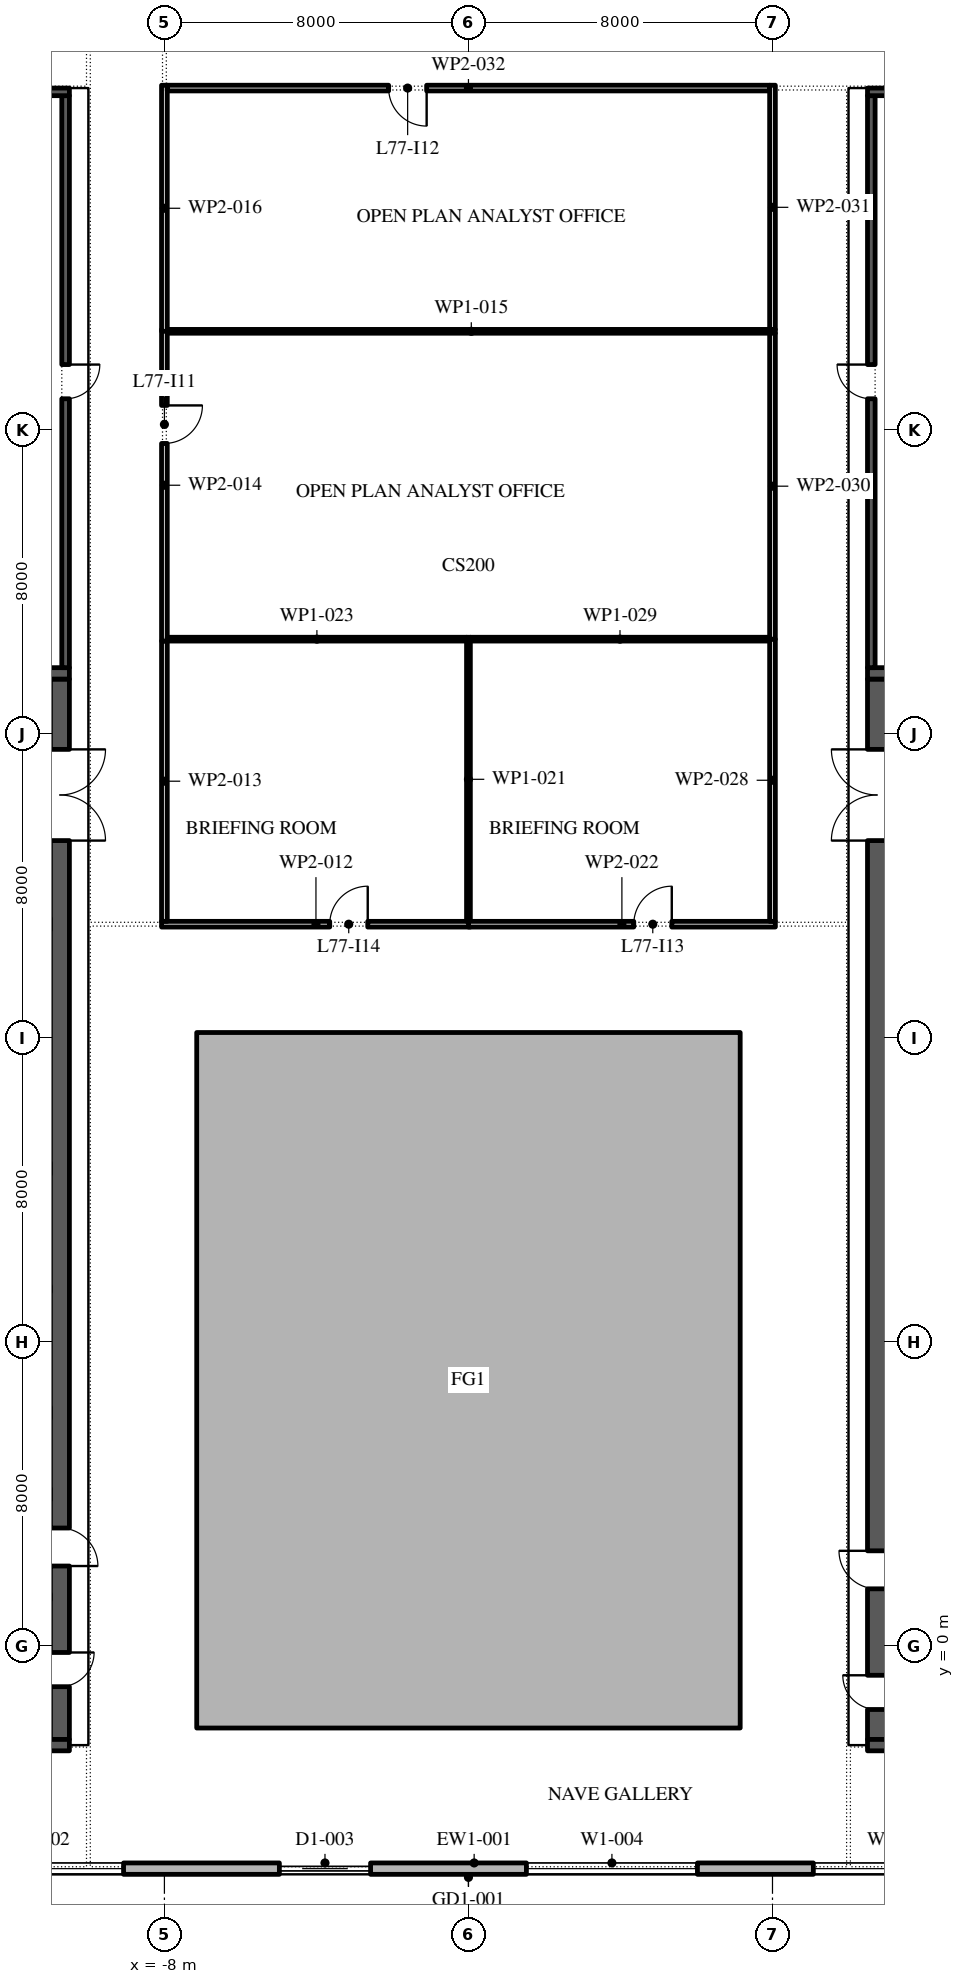
"""IFC4 building model, lengths in metres.
Left out: names, types, materials, properties, quantities, classifications, styles, units other than length and angle.
Written with IfcOpenShell. Run it as: python <this file> out.ifc"""

import sys

from ifc_helpers import new_model, si_unit, direction, frame, frame_2d, origin, place, context, subcontext, project, spatial, polyline, rectangle, outline, extrude, element, fill, save


model = new_model("IFC4")
c1 = context("Model", 3, precision=1e-05, world=origin(), true_north=direction((0.0, 1.0)))
c2 = subcontext(c1, "Body", "Model", "MODEL_VIEW")
j1 = project(units=[si_unit("LENGTHUNIT", "METRE"), si_unit("PLANEANGLEUNIT", "RADIAN")], contexts=[c1])
p1 = place(None, origin())
s1 = spatial("IfcSite", under=j1, at=p1, CompositionType="ELEMENT")
p2 = place(p1, origin())
s2 = spatial("IfcBuilding", under=s1, at=p2, CompositionType="ELEMENT")
p3 = place(p2, frame((0.0, 0.0, 351.0)))
s3 = spatial("IfcBuildingStorey", under=s2, at=p3, CompositionType="ELEMENT", Elevation=351.0)
p4 = place(p3, origin())
e1 = element("IfcWall", 1, at=p4, inside=s3, PredefinedType="STANDARD", context=c2, shape_type="SweptSolid", body=[
    extrude(outline(polyline([(-7.15, -2.15), (7.15, -2.15), (7.15, 16.15), (-7.15, 16.15), (-7.15, -2.15)]), holes=[polyline([(-7.0, -2.0), (-7.0, 16.0), (7.0, 16.0), (7.0, -2.0), (-7.0, -2.0)])]), origin(), (0.0, 0.0, 1.0), 4.0),
])
p5 = place(p3, frame((-22.35, -5.85, 0.0), z_axis=(0.0, 0.0, 1.0), x_axis=(1.0, 0.0, 0.0)))
e2 = element("IfcWall", 2, at=p5, inside=s3, PredefinedType="STANDARD", context=c2, shape_type="SweptSolid", body=[
    extrude(rectangle(XDim=45.0, YDim=0.3, at=frame_2d((22.5, 0.0))), origin(), (0.0, 0.0, 1.0), 4.0),
])
p6 = place(p5, frame((1.375, 0.0, 0.45)))
e3 = element("IfcOpeningElement", 3, at=p6, cuts=e2, PredefinedType="OPENING", context=c2, shape_type="SweptSolid", body=[
    extrude(rectangle(XDim=4.5, YDim=3.05, at=frame_2d((2.25, 1.525))), frame((0.0, 0.16, 0.0), z_axis=(0.0, -1.0, 0.0), x_axis=(1.0, 0.0, 0.0)), (0.0, 0.0, 1.0), 0.32),
])
p7 = place(p5, frame((8.775, 0.0, 0.45)))
e4 = element("IfcOpeningElement", 4, at=p7, cuts=e2, PredefinedType="OPENING", context=c2, shape_type="SweptSolid", body=[
    extrude(rectangle(XDim=4.5, YDim=3.05, at=frame_2d((2.25, 1.525))), frame((0.0, 0.16, 0.0), z_axis=(0.0, -1.0, 0.0), x_axis=(1.0, 0.0, 0.0)), (0.0, 0.0, 1.0), 0.32),
])
p8 = place(p5, frame((17.375, 0.0, 0.0)))
e5 = element("IfcOpeningElement", 5, at=p8, cuts=e2, PredefinedType="OPENING", context=c2, shape_type="SweptSolid", body=[
    extrude(rectangle(XDim=2.4, YDim=3.5, at=frame_2d((1.2, 1.75))), frame((0.0, 0.16, 0.0), z_axis=(0.0, -1.0, 0.0), x_axis=(1.0, 0.0, 0.0)), (0.0, 0.0, 1.0), 0.32),
])
p9 = place(p5, frame((23.875, 0.0, 0.45)))
e6 = element("IfcOpeningElement", 6, at=p9, cuts=e2, PredefinedType="OPENING", context=c2, shape_type="SweptSolid", body=[
    extrude(rectangle(XDim=4.5, YDim=3.05, at=frame_2d((2.25, 1.525))), frame((0.0, 0.16, 0.0), z_axis=(0.0, -1.0, 0.0), x_axis=(1.0, 0.0, 0.0)), (0.0, 0.0, 1.0), 0.32),
])
p10 = place(p5, frame((31.425, 0.0, 0.45)))
e7 = element("IfcOpeningElement", 7, at=p10, cuts=e2, PredefinedType="OPENING", context=c2, shape_type="SweptSolid", body=[
    extrude(rectangle(XDim=4.5, YDim=3.05, at=frame_2d((2.25, 1.525))), frame((0.0, 0.16, 0.0), z_axis=(0.0, -1.0, 0.0), x_axis=(1.0, 0.0, 0.0)), (0.0, 0.0, 1.0), 0.32),
])
p11 = place(p5, frame((38.975, 0.0, 0.45)))
e8 = element("IfcOpeningElement", 8, at=p11, cuts=e2, PredefinedType="OPENING", context=c2, shape_type="SweptSolid", body=[
    extrude(rectangle(XDim=4.5, YDim=3.05, at=frame_2d((2.25, 1.525))), frame((0.0, 0.16, 0.0), z_axis=(0.0, -1.0, 0.0), x_axis=(1.0, 0.0, 0.0)), (0.0, 0.0, 1.0), 0.32),
])
p12 = place(p3, frame((-10.75, -2.45, 0.0), z_axis=(0.0, 0.0, 1.0), x_axis=(0.0, 1.0, 0.0)))
e9 = element("IfcWall", 9, at=p12, inside=s3, PredefinedType="SHEAR", context=c2, shape_type="SweptSolid", body=[
    extrude(rectangle(XDim=27.9, YDim=0.5, at=frame_2d((13.95, 0.0))), origin(), (0.0, 0.0, 1.0), 4.0),
])
p13 = place(p12, frame((23.65, 0.0, 0.0)))
e10 = element("IfcOpeningElement", 10, at=p13, cuts=e9, PredefinedType="OPENING", context=c2, shape_type="SweptSolid", body=[
    extrude(rectangle(XDim=2.4, YDim=2.1, at=frame_2d((1.2, 1.05))), frame((0.0, 0.26, 0.0), z_axis=(0.0, -1.0, 0.0), x_axis=(1.0, 0.0, 0.0)), (0.0, 0.0, 1.0), 0.52),
])
p14 = place(p12, frame((1.387, 0.0, 0.0)))
e11 = element("IfcOpeningElement", 11, at=p14, cuts=e9, PredefinedType="OPENING", context=c2, shape_type="SweptSolid", body=[
    extrude(rectangle(XDim=0.9, YDim=2.1, at=frame_2d((0.45, 1.05))), frame((0.0, 0.26, 0.0), z_axis=(0.0, -1.0, 0.0), x_axis=(1.0, 0.0, 0.0)), (0.0, 0.0, 1.0), 0.52),
])
p15 = place(p12, frame((4.562, 0.0, 0.0)))
e12 = element("IfcOpeningElement", 12, at=p15, cuts=e9, PredefinedType="OPENING", context=c2, shape_type="SweptSolid", body=[
    extrude(rectangle(XDim=1.0, YDim=2.1, at=frame_2d((0.5, 1.05))), frame((0.0, 0.26, 0.0), z_axis=(0.0, -1.0, 0.0), x_axis=(1.0, 0.0, 0.0)), (0.0, 0.0, 1.0), 0.52),
])
for number, where, z_axis, x_axis in (
    (13, (-21.5, -2.6, 0.0), (0.0, 0.0, 1.0), (1.0, 0.0, 0.0)),
    (14, (-21.5, 25.6, 0.0), (0.0, 0.0, 1.0), (1.0, 0.0, 0.0)),
):
    element("IfcWall", number, at=place(p3, frame(where, z_axis=z_axis, x_axis=x_axis)), inside=s3, PredefinedType="SHEAR", context=c2, shape_type="SweptSolid", body=[
        extrude(rectangle(XDim=11.0, YDim=0.3, at=frame_2d((5.5, 0.0))), origin(), (0.0, 0.0, 1.0), 4.0),
    ])
p16 = place(p3, frame((-10.6, 25.75, 0.0), z_axis=(0.0, 0.0, 1.0), x_axis=(0.0, 1.0, 0.0)))
e15 = element("IfcWall", 15, at=p16, inside=s3, PredefinedType="SHEAR", context=c2, shape_type="SweptSolid", body=[
    extrude(rectangle(XDim=15.05, YDim=0.2, at=frame_2d((7.525, 0.0))), origin(), (0.0, 0.0, 1.0), 4.0),
])
p17 = place(p16, frame((7.075, 0.0, 0.0)))
e16 = element("IfcOpeningElement", 16, at=p17, cuts=e15, PredefinedType="OPENING", context=c2, shape_type="SweptSolid", body=[
    extrude(rectangle(XDim=0.9, YDim=2.1, at=frame_2d((0.45, 1.05))), frame((0.0, 0.11, 0.0), z_axis=(0.0, -1.0, 0.0), x_axis=(1.0, 0.0, 0.0)), (0.0, 0.0, 1.0), 0.22),
])
p18 = place(p3, frame((-21.5, 40.9, 0.0), z_axis=(0.0, 0.0, 1.0), x_axis=(1.0, 0.0, 0.0)))
e17 = element("IfcWall", 17, at=p18, inside=s3, PredefinedType="SHEAR", context=c2, shape_type="SweptSolid", body=[
    extrude(rectangle(XDim=11.0, YDim=0.2, at=frame_2d((5.5, 0.0))), origin(), (0.0, 0.0, 1.0), 4.0),
])
p19 = place(p3, frame((10.75, -2.45, 0.0), z_axis=(0.0, 0.0, 1.0), x_axis=(0.0, 1.0, 0.0)))
e18 = element("IfcWall", 18, at=p19, inside=s3, PredefinedType="SHEAR", context=c2, shape_type="SweptSolid", body=[
    extrude(rectangle(XDim=27.9, YDim=0.5, at=frame_2d((13.95, 0.0))), origin(), (0.0, 0.0, 1.0), 4.0),
])
p20 = place(p19, frame((23.65, 0.0, 0.0)))
e19 = element("IfcOpeningElement", 19, at=p20, cuts=e18, PredefinedType="OPENING", context=c2, shape_type="SweptSolid", body=[
    extrude(rectangle(XDim=2.4, YDim=2.1, at=frame_2d((1.2, 1.05))), frame((0.0, 0.26, 0.0), z_axis=(0.0, -1.0, 0.0), x_axis=(1.0, 0.0, 0.0)), (0.0, 0.0, 1.0), 0.52),
])
p21 = place(p19, frame((0.788, 0.0, 0.0)))
e20 = element("IfcOpeningElement", 20, at=p21, cuts=e18, PredefinedType="OPENING", context=c2, shape_type="SweptSolid", body=[
    extrude(rectangle(XDim=0.9, YDim=2.1, at=frame_2d((0.45, 1.05))), frame((0.0, 0.26, 0.0), z_axis=(0.0, -1.0, 0.0), x_axis=(1.0, 0.0, 0.0)), (0.0, 0.0, 1.0), 0.52),
])
p22 = place(p19, frame((3.962, 0.0, 0.0)))
e21 = element("IfcOpeningElement", 21, at=p22, cuts=e18, PredefinedType="OPENING", context=c2, shape_type="SweptSolid", body=[
    extrude(rectangle(XDim=1.0, YDim=2.1, at=frame_2d((0.5, 1.05))), frame((0.0, 0.26, 0.0), z_axis=(0.0, -1.0, 0.0), x_axis=(1.0, 0.0, 0.0)), (0.0, 0.0, 1.0), 0.52),
])
for number, where, z_axis, x_axis in (
    (22, (10.5, -2.6, 0.0), (0.0, 0.0, 1.0), (1.0, 0.0, 0.0)),
    (23, (10.5, 25.6, 0.0), (0.0, 0.0, 1.0), (1.0, 0.0, 0.0)),
):
    element("IfcWall", number, at=place(p3, frame(where, z_axis=z_axis, x_axis=x_axis)), inside=s3, PredefinedType="SHEAR", context=c2, shape_type="SweptSolid", body=[
        extrude(rectangle(XDim=11.0, YDim=0.3, at=frame_2d((5.5, 0.0))), origin(), (0.0, 0.0, 1.0), 4.0),
    ])
p23 = place(p3, frame((10.6, 25.75, 0.0), z_axis=(0.0, 0.0, 1.0), x_axis=(0.0, 1.0, 0.0)))
e24 = element("IfcWall", 24, at=p23, inside=s3, PredefinedType="SHEAR", context=c2, shape_type="SweptSolid", body=[
    extrude(rectangle(XDim=15.05, YDim=0.2, at=frame_2d((7.525, 0.0))), origin(), (0.0, 0.0, 1.0), 4.0),
])
p24 = place(p23, frame((7.075, 0.0, 0.0)))
e25 = element("IfcOpeningElement", 25, at=p24, cuts=e24, PredefinedType="OPENING", context=c2, shape_type="SweptSolid", body=[
    extrude(rectangle(XDim=0.9, YDim=2.1, at=frame_2d((0.45, 1.05))), frame((0.0, 0.11, 0.0), z_axis=(0.0, -1.0, 0.0), x_axis=(1.0, 0.0, 0.0)), (0.0, 0.0, 1.0), 0.22),
])
p25 = place(p3, frame((10.5, 40.9, 0.0), z_axis=(0.0, 0.0, 1.0), x_axis=(1.0, 0.0, 0.0)))
e26 = element("IfcWall", 26, at=p25, inside=s3, PredefinedType="SHEAR", context=c2, shape_type="SweptSolid", body=[
    extrude(rectangle(XDim=11.0, YDim=0.2, at=frame_2d((5.5, 0.0))), origin(), (0.0, 0.0, 1.0), 4.0),
])
p26 = place(p3, frame((-8.075, 19.0, 0.0), z_axis=(0.0, 0.0, 1.0), x_axis=(1.0, 0.0, 0.0)))
e27 = element("IfcWall", 27, at=p26, inside=s3, PredefinedType="PARTITIONING", context=c2, shape_type="SweptSolid", body=[
    extrude(rectangle(XDim=8.125, YDim=0.15, at=frame_2d((4.062, 0.0))), origin(), (0.0, 0.0, 1.0), 4.0),
])
p27 = place(p26, frame((4.425, 0.0, 0.0)))
e28 = element("IfcOpeningElement", 28, at=p27, cuts=e27, PredefinedType="OPENING", context=c2, shape_type="SweptSolid", body=[
    extrude(rectangle(XDim=1.0, YDim=2.1, at=frame_2d((0.5, 1.05))), frame((0.0, 0.085, 0.0), z_axis=(0.0, -1.0, 0.0), x_axis=(1.0, 0.0, 0.0)), (0.0, 0.0, 1.0), 0.17),
])
p28 = place(p3, frame((-8.0, 26.45, 0.0), z_axis=(0.0, 0.0, 1.0), x_axis=(0.0, -1.0, 0.0)))
e29 = element("IfcWall", 29, at=p28, inside=s3, PredefinedType="PARTITIONING", context=c2, shape_type="SweptSolid", body=[
    extrude(rectangle(XDim=7.375, YDim=0.15, at=frame_2d((3.688, 0.0))), origin(), (0.0, 0.0, 1.0), 4.0),
])
p29 = place(p3, frame((-8.0, 34.65, 0.0), z_axis=(0.0, 0.0, 1.0), x_axis=(0.0, -1.0, 0.0)))
e30 = element("IfcWall", 30, at=p29, inside=s3, PredefinedType="PARTITIONING", context=c2, shape_type="SweptSolid", body=[
    extrude(rectangle(XDim=8.2, YDim=0.15, at=frame_2d((4.1, 0.0))), origin(), (0.0, 0.0, 1.0), 4.0),
])
p30 = place(p29, frame((2.0, 0.0, 0.0)))
e31 = element("IfcOpeningElement", 31, at=p30, cuts=e30, PredefinedType="OPENING", context=c2, shape_type="SweptSolid", body=[
    extrude(rectangle(XDim=1.0, YDim=2.1, at=frame_2d((0.5, 1.05))), frame((0.0, 0.085, 0.0), z_axis=(0.0, -1.0, 0.0), x_axis=(1.0, 0.0, 0.0)), (0.0, 0.0, 1.0), 0.17),
])
p31 = place(p3, frame((-7.925, 34.6, 0.0), z_axis=(0.0, 0.0, 1.0), x_axis=(1.0, 0.0, 0.0)))
e32 = element("IfcWall", 32, at=p31, inside=s3, PredefinedType="PARTITIONING", context=c2, shape_type="SweptSolid", body=[
    extrude(rectangle(XDim=16.0, YDim=0.1, at=frame_2d((8.0, 0.0))), origin(), (0.0, 0.0, 1.0), 4.0),
])
p32 = place(p3, frame((-8.0, 41.075, 0.0), z_axis=(0.0, 0.0, 1.0), x_axis=(0.0, -1.0, 0.0)))
e33 = element("IfcWall", 33, at=p32, inside=s3, PredefinedType="PARTITIONING", context=c2, shape_type="SweptSolid", body=[
    extrude(rectangle(XDim=6.475, YDim=0.15, at=frame_2d((3.237, 0.0))), origin(), (0.0, 0.0, 1.0), 4.0),
])
p33 = place(p3, frame((0.0, 19.075, 0.0), z_axis=(0.0, 0.0, 1.0), x_axis=(0.0, 1.0, 0.0)))
e34 = element("IfcWall", 34, at=p33, inside=s3, PredefinedType="PARTITIONING", context=c2, shape_type="SweptSolid", body=[
    extrude(rectangle(XDim=7.475, YDim=0.1, at=frame_2d((3.738, 0.0))), origin(), (0.0, 0.0, 1.0), 4.0),
])
p34 = place(p3, frame((0.0, 19.0, 0.0), z_axis=(0.0, 0.0, 1.0), x_axis=(1.0, 0.0, 0.0)))
e35 = element("IfcWall", 35, at=p34, inside=s3, PredefinedType="PARTITIONING", context=c2, shape_type="SweptSolid", body=[
    extrude(rectangle(XDim=8.075, YDim=0.15, at=frame_2d((4.038, 0.0))), origin(), (0.0, 0.0, 1.0), 4.0),
])
p35 = place(p34, frame((4.35, 0.0, 0.0)))
e36 = element("IfcOpeningElement", 36, at=p35, cuts=e35, PredefinedType="OPENING", context=c2, shape_type="SweptSolid", body=[
    extrude(rectangle(XDim=1.0, YDim=2.1, at=frame_2d((0.5, 1.05))), frame((0.0, 0.085, 0.0), z_axis=(0.0, -1.0, 0.0), x_axis=(1.0, 0.0, 0.0)), (0.0, 0.0, 1.0), 0.17),
])
p36 = place(p3, frame((-0.05, 26.5, 0.0), z_axis=(0.0, 0.0, 1.0), x_axis=(-1.0, 0.0, 0.0)))
e37 = element("IfcWall", 37, at=p36, inside=s3, PredefinedType="PARTITIONING", context=c2, shape_type="SweptSolid", body=[
    extrude(rectangle(XDim=7.875, YDim=0.1, at=frame_2d((3.938, 0.0))), origin(), (0.0, 0.0, 1.0), 4.0),
])
p37 = place(p3, frame((8.0, 19.075, 0.0), z_axis=(0.0, 0.0, 1.0), x_axis=(0.0, 1.0, 0.0)))
e38 = element("IfcWall", 38, at=p37, inside=s3, PredefinedType="PARTITIONING", context=c2, shape_type="SweptSolid", body=[
    extrude(rectangle(XDim=7.425, YDim=0.15, at=frame_2d((3.712, 0.0))), origin(), (0.0, 0.0, 1.0), 4.0),
])
p38 = place(p3, frame((7.925, 26.5, 0.0), z_axis=(0.0, 0.0, 1.0), x_axis=(-1.0, 0.0, 0.0)))
e39 = element("IfcWall", 39, at=p38, inside=s3, PredefinedType="PARTITIONING", context=c2, shape_type="SweptSolid", body=[
    extrude(rectangle(XDim=7.875, YDim=0.1, at=frame_2d((3.938, 0.0))), origin(), (0.0, 0.0, 1.0), 4.0),
])
p39 = place(p3, frame((8.0, 26.5, 0.0), z_axis=(0.0, 0.0, 1.0), x_axis=(0.0, 1.0, 0.0)))
e40 = element("IfcWall", 40, at=p39, inside=s3, PredefinedType="PARTITIONING", context=c2, shape_type="SweptSolid", body=[
    extrude(rectangle(XDim=8.05, YDim=0.15, at=frame_2d((4.025, 0.0))), origin(), (0.0, 0.0, 1.0), 4.0),
])
p40 = place(p3, frame((8.0, 34.65, 0.0), z_axis=(0.0, 0.0, 1.0), x_axis=(0.0, 1.0, 0.0)))
e41 = element("IfcWall", 41, at=p40, inside=s3, PredefinedType="PARTITIONING", context=c2, shape_type="SweptSolid", body=[
    extrude(rectangle(XDim=6.425, YDim=0.15, at=frame_2d((3.212, 0.0))), origin(), (0.0, 0.0, 1.0), 4.0),
])
p41 = place(p3, frame((7.925, 41.0, 0.0), z_axis=(0.0, 0.0, 1.0), x_axis=(-1.0, 0.0, 0.0)))
e42 = element("IfcWall", 42, at=p41, inside=s3, PredefinedType="PARTITIONING", context=c2, shape_type="SweptSolid", body=[
    extrude(rectangle(XDim=15.85, YDim=0.15, at=frame_2d((7.925, 0.0))), origin(), (0.0, 0.0, 1.0), 4.0),
])
p42 = place(p41, frame((9.025, 0.0, 0.0)))
e43 = element("IfcOpeningElement", 43, at=p42, cuts=e42, PredefinedType="OPENING", context=c2, shape_type="SweptSolid", body=[
    extrude(rectangle(XDim=1.0, YDim=2.1, at=frame_2d((0.5, 1.05))), frame((0.0, 0.085, 0.0), z_axis=(0.0, -1.0, 0.0), x_axis=(1.0, 0.0, 0.0)), (0.0, 0.0, 1.0), 0.17),
])
p43 = place(p7, origin())
e44 = element("IfcWindow", 44, at=p43, inside=s3, PartitioningType="DOUBLE_PANEL_VERTICAL", PredefinedType="WINDOW", context=c2, shape_type="SweptSolid", body=[
    extrude(rectangle(XDim=4.5, YDim=3.05, at=frame_2d((2.25, 1.525))), frame((0.0, 0.03, 0.0), z_axis=(0.0, -1.0, 0.0), x_axis=(1.0, 0.0, 0.0)), (0.0, 0.0, 1.0), 0.06),
])
fill(e4, e44)
p44 = place(p8, origin())
e45 = element("IfcDoor", 45, at=p44, inside=s3, OperationType="DOUBLE_DOOR_SLIDING", PredefinedType="DOOR", context=c2, shape_type="SweptSolid", body=[
    extrude(rectangle(XDim=2.4, YDim=3.5, at=frame_2d((1.2, 1.75))), frame((0.0, 0.025, 0.0), z_axis=(0.0, -1.0, 0.0), x_axis=(1.0, 0.0, 0.0)), (0.0, 0.0, 1.0), 0.05),
])
fill(e5, e45)
p45 = place(p9, origin())
e46 = element("IfcWindow", 46, at=p45, inside=s3, PartitioningType="DOUBLE_PANEL_VERTICAL", PredefinedType="WINDOW", context=c2, shape_type="SweptSolid", body=[
    extrude(rectangle(XDim=4.5, YDim=3.05, at=frame_2d((2.25, 1.525))), frame((0.0, 0.03, 0.0), z_axis=(0.0, -1.0, 0.0), x_axis=(1.0, 0.0, 0.0)), (0.0, 0.0, 1.0), 0.06),
])
fill(e6, e46)
p46 = place(p10, origin())
e47 = element("IfcWindow", 47, at=p46, inside=s3, PartitioningType="DOUBLE_PANEL_VERTICAL", PredefinedType="WINDOW", context=c2, shape_type="SweptSolid", body=[
    extrude(rectangle(XDim=4.5, YDim=3.05, at=frame_2d((2.25, 1.525))), frame((0.0, 0.03, 0.0), z_axis=(0.0, -1.0, 0.0), x_axis=(1.0, 0.0, 0.0)), (0.0, 0.0, 1.0), 0.06),
])
fill(e7, e47)
p47 = place(p13, frame((2.4, 0.0, 0.0), z_axis=(0.0, 0.0, 1.0), x_axis=(-1.0, 0.0, 0.0)))
e48 = element("IfcDoor", 48, at=p47, inside=s3, OperationType="DOUBLE_DOOR_SINGLE_SWING", PredefinedType="DOOR", context=c2, shape_type="SweptSolid", body=[
    extrude(rectangle(XDim=2.4, YDim=2.1, at=frame_2d((1.2, 1.05))), frame((0.0, 0.025, 0.0), z_axis=(0.0, -1.0, 0.0), x_axis=(1.0, 0.0, 0.0)), (0.0, 0.0, 1.0), 0.05),
])
fill(e10, e48)
p48 = place(p17, frame((0.9, 0.15, 0.0), z_axis=(0.0, 0.0, 1.0), x_axis=(-1.0, 0.0, 0.0)))
e49 = element("IfcDoor", 49, at=p48, inside=s3, OperationType="SINGLE_SWING_RIGHT", PredefinedType="DOOR", context=c2, shape_type="SweptSolid", body=[
    extrude(rectangle(XDim=0.9, YDim=2.1, at=frame_2d((0.45, 1.05))), frame((0.0, 0.1, 0.0), z_axis=(0.0, -1.0, 0.0), x_axis=(1.0, 0.0, 0.0)), (0.0, 0.0, 1.0), 0.05),
])
fill(e16, e49)
p49 = place(p20, origin())
e50 = element("IfcDoor", 50, at=p49, inside=s3, OperationType="DOUBLE_DOOR_SINGLE_SWING", PredefinedType="DOOR", context=c2, shape_type="SweptSolid", body=[
    extrude(rectangle(XDim=2.4, YDim=2.1, at=frame_2d((1.2, 1.05))), frame((0.0, 0.025, 0.0), z_axis=(0.0, -1.0, 0.0), x_axis=(1.0, 0.0, 0.0)), (0.0, 0.0, 1.0), 0.05),
])
fill(e19, e50)
p50 = place(p24, origin())
e51 = element("IfcDoor", 51, at=p50, inside=s3, OperationType="SINGLE_SWING_LEFT", PredefinedType="DOOR", context=c2, shape_type="SweptSolid", body=[
    extrude(rectangle(XDim=0.9, YDim=2.1, at=frame_2d((0.45, 1.05))), frame((0.0, -0.05, 0.0), z_axis=(0.0, -1.0, 0.0), x_axis=(1.0, 0.0, 0.0)), (0.0, 0.0, 1.0), 0.05),
])
fill(e25, e51)
p51 = place(p30, origin())
e52 = element("IfcDoor", 52, at=p51, inside=s3, OperationType="SINGLE_SWING_RIGHT", PredefinedType="DOOR", context=c2, shape_type="SweptSolid", body=[
    extrude(rectangle(XDim=1.0, YDim=2.1, at=frame_2d((0.5, 1.05))), frame((0.0, 0.025, 0.0), z_axis=(0.0, -1.0, 0.0), x_axis=(1.0, 0.0, 0.0)), (0.0, 0.0, 1.0), 0.05),
])
fill(e31, e52)
p52 = place(p42, origin())
e53 = element("IfcDoor", 53, at=p52, inside=s3, OperationType="SINGLE_SWING_RIGHT", PredefinedType="DOOR", context=c2, shape_type="SweptSolid", body=[
    extrude(rectangle(XDim=1.0, YDim=2.1, at=frame_2d((0.5, 1.05))), frame((0.0, 0.025, 0.0), z_axis=(0.0, -1.0, 0.0), x_axis=(1.0, 0.0, 0.0)), (0.0, 0.0, 1.0), 0.05),
])
fill(e43, e53)
p53 = place(p35, origin())
e54 = element("IfcDoor", 54, at=p53, inside=s3, OperationType="SINGLE_SWING_LEFT", PredefinedType="DOOR", context=c2, shape_type="SweptSolid", body=[
    extrude(rectangle(XDim=1.0, YDim=2.1, at=frame_2d((0.5, 1.05))), frame((0.0, 0.025, 0.0), z_axis=(0.0, -1.0, 0.0), x_axis=(1.0, 0.0, 0.0)), (0.0, 0.0, 1.0), 0.05),
])
fill(e36, e54)
p54 = place(p27, origin())
e55 = element("IfcDoor", 55, at=p54, inside=s3, OperationType="SINGLE_SWING_LEFT", PredefinedType="DOOR", context=c2, shape_type="SweptSolid", body=[
    extrude(rectangle(XDim=1.0, YDim=2.1, at=frame_2d((0.5, 1.05))), frame((0.0, 0.025, 0.0), z_axis=(0.0, -1.0, 0.0), x_axis=(1.0, 0.0, 0.0)), (0.0, 0.0, 1.0), 0.05),
])
fill(e28, e55)
save(model, sys.argv[1])
